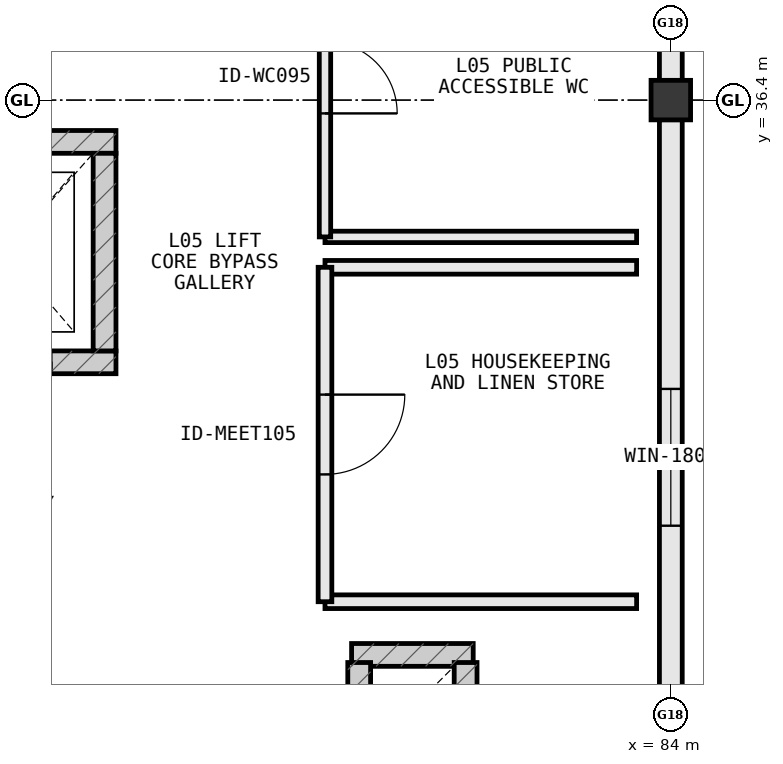
"""IFC4 building model, lengths in metres.
Left out: names, types, materials, properties, quantities, classifications, styles, units other than length and angle.
Written with IfcOpenShell. Run it as: python <this file> out.ifc"""

import sys

from ifc_helpers import new_model, si_unit, direction, frame, frame_2d, origin, origin_2d, place, context, subcontext, project, spatial, rectangle, extrude, element, fill, save


model = new_model("IFC4")
c1 = context("Model", 3, precision=1e-05, world=origin(), true_north=direction((0.0, 1.0)))
c2 = subcontext(c1, "Body", "Model", "MODEL_VIEW")
j1 = project(units=[si_unit("LENGTHUNIT", "METRE"), si_unit("PLANEANGLEUNIT", "RADIAN")], contexts=[c1])
p1 = place(None, origin())
s1 = spatial("IfcSite", under=j1, at=p1, CompositionType="ELEMENT")
p2 = place(p1, origin())
s2 = spatial("IfcBuilding", under=s1, at=p2, CompositionType="ELEMENT")
p3 = place(p2, frame((0.0, 0.0, 23.8)))
s3 = spatial("IfcBuildingStorey", under=s2, at=p3, CompositionType="ELEMENT", Elevation=23.8)
p4 = place(p3, frame((84.0, 36.4, 0.0), z_axis=(0.0, 0.0, 1.0), x_axis=(1.0, 0.0, 0.0)))
e1 = element("IfcColumn", 1, at=p4, inside=s3, PredefinedType="COLUMN", context=c2, shape_type="SweptSolid", body=[
    extrude(rectangle(XDim=0.52, YDim=0.52, at=origin_2d()), origin(), (0.0, 0.0, 1.0), 3.8),
])
p5 = place(p3, frame((81.4, 29.1, 0.0), z_axis=(0.0, 0.0, 1.0), x_axis=(-1.0, 0.0, 0.0)))
e2 = element("IfcWall", 2, at=p5, inside=s3, PredefinedType="SHEAR", context=c2, shape_type="SweptSolid", body=[
    extrude(rectangle(XDim=1.6, YDim=0.3, at=frame_2d((0.8, 0.0))), origin(), (0.0, 0.0, 1.0), 3.55),
])
for number, where, z_axis, x_axis in (
    (3, (79.9, 29.0, 0.0), (0.0, 0.0, 1.0), (0.0, -1.0, 0.0)),
    (4, (81.3, 27.8, 0.0), (0.0, 0.0, 1.0), (0.0, 1.0, 0.0)),
):
    element("IfcWall", number, at=place(p3, frame(where, z_axis=z_axis, x_axis=x_axis)), inside=s3, PredefinedType="SHEAR", context=c2, shape_type="SweptSolid", body=[
        extrude(rectangle(XDim=1.2, YDim=0.3, at=frame_2d((0.6, 0.0))), origin(), (0.0, 0.0, 1.0), 3.55),
    ])
p6 = place(p3, frame((84.0, 27.258, 0.0), z_axis=(0.0, 0.0, 1.0), x_axis=(0.0, 1.0, 0.0)))
e5 = element("IfcWall", 5, at=p6, inside=s3, PredefinedType="STANDARD", context=c2, shape_type="SweptSolid", body=[
    extrude(rectangle(XDim=8.884, YDim=0.3, at=frame_2d((4.442, 0.0))), origin(), (0.0, 0.0, 1.0), 2.965),
])
p7 = place(p6, frame((3.542, 0.0, 0.85)))
e6 = element("IfcOpeningElement", 6, at=p7, cuts=e5, PredefinedType="OPENING", context=c2, shape_type="SweptSolid", body=[
    extrude(rectangle(XDim=1.8, YDim=1.85, at=frame_2d((0.9, 0.925))), frame((0.0, 0.162, 0.0), z_axis=(0.0, -1.0, 0.0), x_axis=(1.0, 0.0, 0.0)), (0.0, 0.0, 1.0), 0.324),
])
p8 = place(p3, frame((84.0, 36.658, 0.0), z_axis=(0.0, 0.0, 1.0), x_axis=(0.0, 1.0, 0.0)))
e7 = element("IfcWall", 7, at=p8, inside=s3, PredefinedType="STANDARD", context=c2, shape_type="SweptSolid", body=[
    extrude(rectangle(XDim=10.284, YDim=0.3, at=frame_2d((5.142, 0.0))), origin(), (0.0, 0.0, 1.0), 2.965),
])
p9 = place(p8, frame((6.813, 0.0, 0.85)))
e8 = element("IfcOpeningElement", 8, at=p9, cuts=e7, PredefinedType="OPENING", context=c2, shape_type="SweptSolid", body=[
    extrude(rectangle(XDim=1.8, YDim=1.85, at=frame_2d((0.9, 0.925))), frame((0.0, 0.162, 0.0), z_axis=(0.0, -1.0, 0.0), x_axis=(1.0, 0.0, 0.0)), (0.0, 0.0, 1.0), 0.324),
])
p10 = place(p3, frame((73.8, 32.95, 0.0), z_axis=(0.0, 0.0, 1.0), x_axis=(1.0, 0.0, 0.0)))
e9 = element("IfcWall", 9, at=p10, inside=s3, PredefinedType="SHEAR", context=c2, shape_type="SweptSolid", body=[
    extrude(rectangle(XDim=2.9, YDim=0.3, at=frame_2d((1.45, 0.0))), origin(), (0.0, 0.0, 1.0), 3.8),
])
p11 = place(p10, frame((0.85, 0.0, 0.0)))
e10 = element("IfcOpeningElement", 10, at=p11, cuts=e9, PredefinedType="OPENING", context=c2, shape_type="SweptSolid", body=[
    extrude(rectangle(XDim=1.2, YDim=2.2, at=frame_2d((0.6, 1.1))), frame((0.0, 0.162, 0.0), z_axis=(0.0, -1.0, 0.0), x_axis=(1.0, 0.0, 0.0)), (0.0, 0.0, 1.0), 0.324),
])
p12 = place(p3, frame((76.7, 35.85, 0.0), z_axis=(0.0, 0.0, 1.0), x_axis=(-1.0, 0.0, 0.0)))
e11 = element("IfcWall", 11, at=p12, inside=s3, PredefinedType="SHEAR", context=c2, shape_type="SweptSolid", body=[
    extrude(rectangle(XDim=2.9, YDim=0.3, at=frame_2d((1.45, 0.0))), origin(), (0.0, 0.0, 1.0), 3.8),
])
p13 = place(p3, frame((76.55, 33.1, 0.0), z_axis=(0.0, 0.0, 1.0), x_axis=(0.0, 1.0, 0.0)))
e12 = element("IfcWall", 12, at=p13, inside=s3, PredefinedType="SHEAR", context=c2, shape_type="SweptSolid", body=[
    extrude(rectangle(XDim=2.6, YDim=0.3, at=frame_2d((1.3, 0.0))), origin(), (0.0, 0.0, 1.0), 3.8),
])
for number, where, z_axis, x_axis in (
    (13, (79.45, 29.8, 0.0), (0.0, 0.0, 1.0), (1.0, 0.0, 0.0)),
    (14, (83.55, 34.2, 0.0), (0.0, 0.0, 1.0), (-1.0, 0.0, 0.0)),
):
    element("IfcWall", number, at=place(p3, frame(where, z_axis=z_axis, x_axis=x_axis)), inside=s3, PredefinedType="PARTITIONING", context=c2, shape_type="SweptSolid", body=[
        extrude(rectangle(XDim=4.1, YDim=0.18, at=frame_2d((2.05, 0.0))), origin(), (0.0, 0.0, 1.0), 3.55),
    ])
p14 = place(p3, frame((79.45, 34.2, 0.0), z_axis=(0.0, 0.0, 1.0), x_axis=(0.0, -1.0, 0.0)))
e15 = element("IfcWall", 15, at=p14, inside=s3, PredefinedType="PARTITIONING", context=c2, shape_type="SweptSolid", body=[
    extrude(rectangle(XDim=4.4, YDim=0.18, at=frame_2d((2.2, 0.0))), origin(), (0.0, 0.0, 1.0), 3.55),
])
p15 = place(p14, frame((1.675, 0.0, 0.0)))
e16 = element("IfcOpeningElement", 16, at=p15, cuts=e15, PredefinedType="OPENING", context=c2, shape_type="SweptSolid", body=[
    extrude(rectangle(XDim=1.05, YDim=2.2, at=frame_2d((0.525, 1.1))), frame((0.0, 0.102, 0.0), z_axis=(0.0, -1.0, 0.0), x_axis=(1.0, 0.0, 0.0)), (0.0, 0.0, 1.0), 0.204),
])
p16 = place(p3, frame((79.45, 34.6, 0.0), z_axis=(0.0, 0.0, 1.0), x_axis=(1.0, 0.0, 0.0)))
e17 = element("IfcWall", 17, at=p16, inside=s3, PredefinedType="PLUMBINGWALL", context=c2, shape_type="SweptSolid", body=[
    extrude(rectangle(XDim=4.1, YDim=0.15, at=frame_2d((2.05, 0.0))), origin(), (0.0, 0.0, 1.0), 3.55),
])
p17 = place(p3, frame((79.45, 38.8, 0.0), z_axis=(0.0, 0.0, 1.0), x_axis=(0.0, -1.0, 0.0)))
e18 = element("IfcWall", 18, at=p17, inside=s3, PredefinedType="PLUMBINGWALL", context=c2, shape_type="SweptSolid", body=[
    extrude(rectangle(XDim=4.2, YDim=0.15, at=frame_2d((2.1, 0.0))), origin(), (0.0, 0.0, 1.0), 3.55),
])
p18 = place(p17, frame((1.625, 0.0, 0.0)))
e19 = element("IfcOpeningElement", 19, at=p18, cuts=e18, PredefinedType="OPENING", context=c2, shape_type="SweptSolid", body=[
    extrude(rectangle(XDim=0.95, YDim=2.15, at=frame_2d((0.475, 1.075))), frame((0.0, 0.087, 0.0), z_axis=(0.0, -1.0, 0.0), x_axis=(1.0, 0.0, 0.0)), (0.0, 0.0, 1.0), 0.174),
])
p19 = place(p7, origin())
e20 = element("IfcWindow", 20, at=p19, inside=s3, PartitioningType="SINGLE_PANEL", PredefinedType="WINDOW", context=c2, shape_type="SweptSolid", body=[
    extrude(rectangle(XDim=1.8, YDim=1.85, at=frame_2d((0.9, 0.925))), frame((0.0, 0.03, 0.0), z_axis=(0.0, -1.0, 0.0), x_axis=(1.0, 0.0, 0.0)), (0.0, 0.0, 1.0), 0.06),
])
fill(e6, e20)
p20 = place(p15, origin())
e21 = element("IfcDoor", 21, at=p20, inside=s3, OperationType="SINGLE_SWING_LEFT", PredefinedType="DOOR", context=c2, shape_type="SweptSolid", body=[
    extrude(rectangle(XDim=1.05, YDim=2.2, at=frame_2d((0.525, 1.1))), frame((0.0, 0.025, 0.0), z_axis=(0.0, -1.0, 0.0), x_axis=(1.0, 0.0, 0.0)), (0.0, 0.0, 1.0), 0.05),
])
fill(e16, e21)
p21 = place(p18, origin())
e22 = element("IfcDoor", 22, at=p21, inside=s3, OperationType="SINGLE_SWING_RIGHT", PredefinedType="DOOR", context=c2, shape_type="SweptSolid", body=[
    extrude(rectangle(XDim=0.95, YDim=2.15, at=frame_2d((0.475, 1.075))), frame((0.0, 0.025, 0.0), z_axis=(0.0, -1.0, 0.0), x_axis=(1.0, 0.0, 0.0)), (0.0, 0.0, 1.0), 0.05),
])
fill(e19, e22)
save(model, sys.argv[1])
